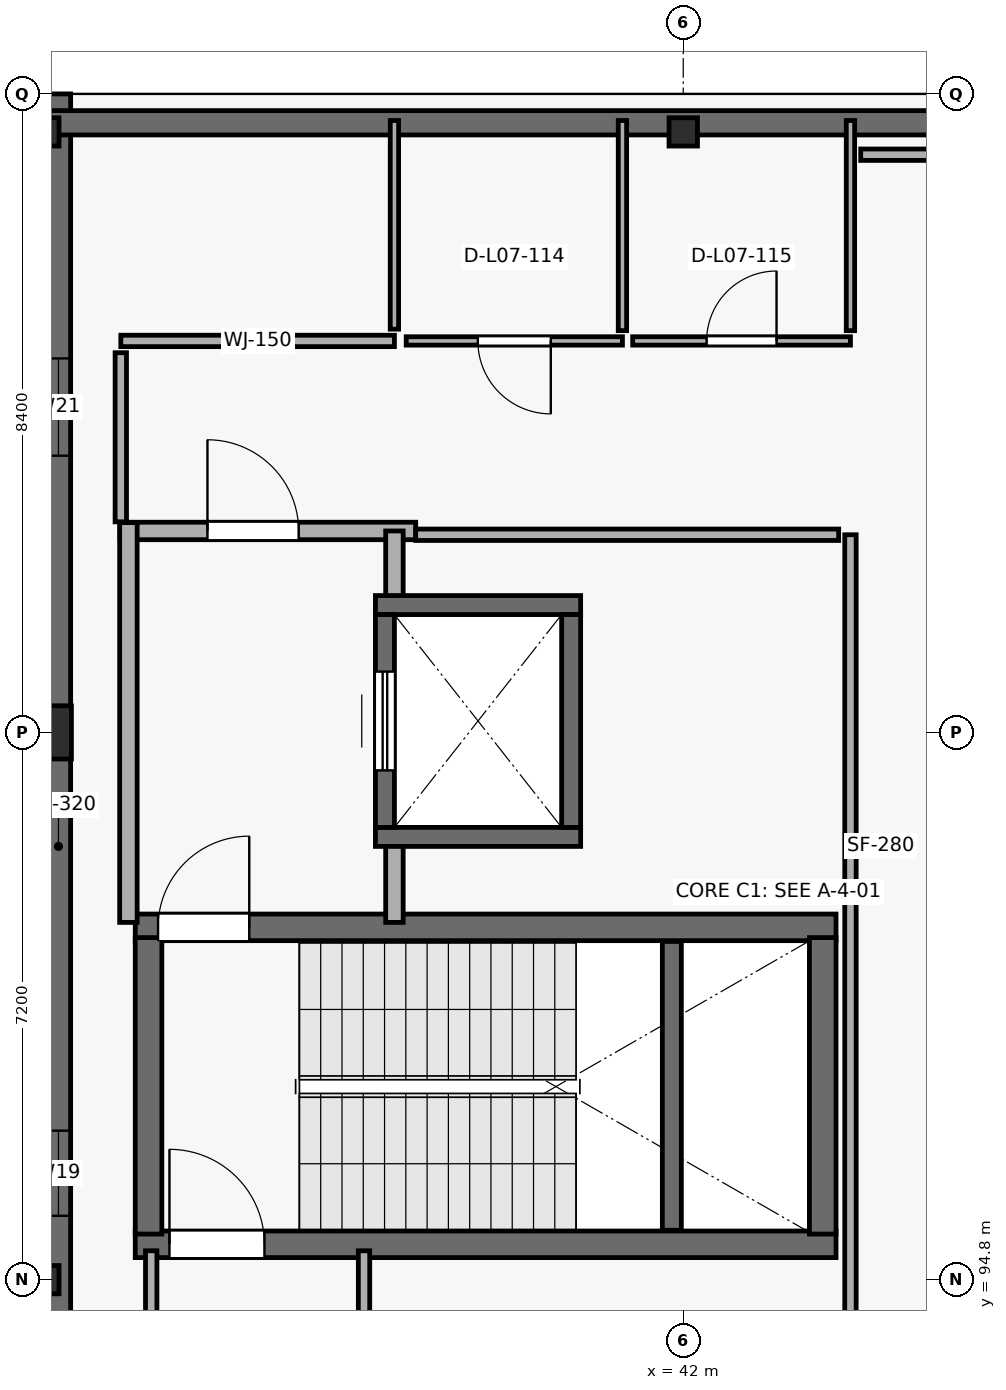
"""IFC4 building model, lengths in metres.
Left out: names, types, materials, properties, quantities, classifications, styles, units other than length and angle.
Written with IfcOpenShell. Run it as: python <this file> out.ifc"""

import sys

from ifc_helpers import new_model, si_unit, direction, frame, frame_2d, origin, origin_2d, place, context, subcontext, project, spatial, rectangle, i_section, extrude, element, fill, save


model = new_model("IFC4")
c1 = context("Model", 3, precision=1e-05, world=origin(), true_north=direction((0.0, 1.0)))
c2 = subcontext(c1, "Body", "Model", "MODEL_VIEW")
j1 = project(units=[si_unit("LENGTHUNIT", "METRE"), si_unit("PLANEANGLEUNIT", "RADIAN")], contexts=[c1])
p1 = place(None, origin())
s1 = spatial("IfcSite", under=j1, at=p1, CompositionType="ELEMENT")
p2 = place(p1, origin())
s2 = spatial("IfcBuilding", under=s1, at=p2, CompositionType="ELEMENT")
p3 = place(p2, frame((0.0, 0.0, 30.6)))
s3 = spatial("IfcBuildingStorey", under=s2, at=p3, CompositionType="ELEMENT", Elevation=30.6)
p4 = place(p3, frame((33.6, 94.8, 0.0), z_axis=(0.0, 0.0, 1.0), x_axis=(1.0, 0.0, 0.0)))
e1 = element("IfcColumn", 1, at=p4, inside=s3, PredefinedType="COLUMN", context=c2, shape_type="SweptSolid", body=[
    extrude(i_section(OverallWidth=0.374, OverallDepth=0.372, WebThickness=0.016, FlangeThickness=0.026, at=origin_2d()), origin(), (0.0, 0.0, 1.0), 5.1),
])
p5 = place(p3, frame((33.6, 102.0, 0.0), z_axis=(0.0, 0.0, 1.0), x_axis=(1.0, 0.0, 0.0)))
e2 = element("IfcColumn", 2, at=p5, inside=s3, PredefinedType="COLUMN", context=c2, shape_type="SweptSolid", body=[
    extrude(rectangle(XDim=0.7, YDim=0.7, at=origin_2d()), origin(), (0.0, 0.0, 1.0), 5.1),
])
for number, where, z_axis, x_axis in (
    (3, (33.6, 109.9, 0.0), (0.0, 0.0, 1.0), (1.0, 0.0, 0.0)),
    (4, (42.0, 109.9, 0.0), (0.0, 0.0, 1.0), (1.0, 0.0, 0.0)),
):
    element("IfcColumn", number, at=place(p3, frame(where, z_axis=z_axis, x_axis=x_axis)), inside=s3, PredefinedType="COLUMN", context=c2, shape_type="SweptSolid", body=[
        extrude(i_section(OverallWidth=0.374, OverallDepth=0.372, WebThickness=0.016, FlangeThickness=0.026, at=origin_2d()), origin(), (0.0, 0.0, 1.0), 5.1),
    ])
p6 = place(p3, frame((33.78, 90.6, 0.0), z_axis=(0.0, 0.0, 1.0), x_axis=(0.0, 1.0, 0.0)))
e5 = element("IfcWall", 5, at=p6, inside=s3, PredefinedType="SOLIDWALL", context=c2, shape_type="SweptSolid", body=[
    extrude(rectangle(XDim=19.8, YDim=0.32, at=frame_2d((9.9, 0.0))), origin(), (0.0, 0.0, 1.0), 4.84),
])
p7 = place(p6, frame((5.04, 0.0, 0.75)))
e6 = element("IfcOpeningElement", 6, at=p7, cuts=e5, PredefinedType="OPENING", context=c2, shape_type="SweptSolid", body=[
    extrude(rectangle(XDim=1.12, YDim=3.05, at=frame_2d((0.56, 1.525))), frame((0.0, 0.17, 0.0), z_axis=(0.0, -1.0, 0.0), x_axis=(1.0, 0.0, 0.0)), (0.0, 0.0, 1.0), 0.34),
])
p8 = place(p6, frame((15.04, 0.0, 0.75)))
e7 = element("IfcOpeningElement", 7, at=p8, cuts=e5, PredefinedType="OPENING", context=c2, shape_type="SweptSolid", body=[
    extrude(rectangle(XDim=1.28, YDim=1.85, at=frame_2d((0.64, 0.925))), frame((0.0, 0.17, 0.0), z_axis=(0.0, -1.0, 0.0), x_axis=(1.0, 0.0, 0.0)), (0.0, 0.0, 1.0), 0.34),
])
p9 = place(p3, frame((33.6, 110.02, 0.0), z_axis=(0.0, 0.0, 1.0), x_axis=(1.0, 0.0, 0.0)))
e8 = element("IfcWall", 8, at=p9, inside=s3, PredefinedType="SOLIDWALL", context=c2, shape_type="SweptSolid", body=[
    extrude(rectangle(XDim=33.6, YDim=0.32, at=frame_2d((16.8, 0.0))), origin(), (0.0, 0.0, 1.0), 4.84),
])
p10 = place(p3, frame((34.79, 95.265, 0.0), z_axis=(0.0, 0.0, 1.0), x_axis=(1.0, 0.0, 0.0)))
e9 = element("IfcWall", 9, at=p10, inside=s3, PredefinedType="SHEAR", context=c2, shape_type="SweptSolid", body=[
    extrude(rectangle(XDim=9.22, YDim=0.35, at=frame_2d((4.61, 0.0))), origin(), (0.0, 0.0, 1.0), 4.84),
])
p11 = place(p10, frame((0.45, 0.0, 0.0)))
e10 = element("IfcOpeningElement", 10, at=p11, cuts=e9, PredefinedType="OPENING", context=c2, shape_type="SweptSolid", body=[
    extrude(rectangle(XDim=1.25, YDim=2.2, at=frame_2d((0.625, 1.1))), frame((0.0, 0.185, 0.0), z_axis=(0.0, -1.0, 0.0), x_axis=(1.0, 0.0, 0.0)), (0.0, 0.0, 1.0), 0.37),
])
p12 = place(p3, frame((44.01, 99.435, 0.0), z_axis=(0.0, 0.0, 1.0), x_axis=(-1.0, 0.0, 0.0)))
e11 = element("IfcWall", 11, at=p12, inside=s3, PredefinedType="SHEAR", context=c2, shape_type="SweptSolid", body=[
    extrude(rectangle(XDim=9.22, YDim=0.35, at=frame_2d((4.61, 0.0))), origin(), (0.0, 0.0, 1.0), 4.84),
])
p13 = place(p12, frame((7.72, 0.0, 0.0)))
e12 = element("IfcOpeningElement", 12, at=p13, cuts=e11, PredefinedType="OPENING", context=c2, shape_type="SweptSolid", body=[
    extrude(rectangle(XDim=1.2, YDim=2.2, at=frame_2d((0.6, 1.1))), frame((0.0, 0.185, 0.0), z_axis=(0.0, -1.0, 0.0), x_axis=(1.0, 0.0, 0.0)), (0.0, 0.0, 1.0), 0.37),
])
for number, where, z_axis, x_axis in (
    (13, (34.965, 95.4, 0.0), (0.0, 0.0, 1.0), (0.0, 1.0, 0.0)),
    (14, (43.835, 99.3, 0.0), (0.0, 0.0, 1.0), (0.0, -1.0, 0.0)),
):
    element("IfcWall", number, at=place(p3, frame(where, z_axis=z_axis, x_axis=x_axis)), inside=s3, PredefinedType="SHEAR", context=c2, shape_type="SweptSolid", body=[
        extrude(rectangle(XDim=3.9, YDim=0.35, at=frame_2d((1.95, 0.0))), origin(), (0.0, 0.0, 1.0), 4.84),
    ])
p14 = place(p3, frame((41.85, 95.45, 0.0), z_axis=(0.0, 0.0, 1.0), x_axis=(0.0, 1.0, 0.0)))
e15 = element("IfcWall", 15, at=p14, inside=s3, PredefinedType="SHEAR", context=c2, shape_type="SweptSolid", body=[
    extrude(rectangle(XDim=3.8, YDim=0.25, at=frame_2d((1.9, 0.0))), origin(), (0.0, 0.0, 1.0), 2.37),
])
p15 = place(p3, frame((34.59, 104.65, 0.0), z_axis=(0.0, 0.0, 1.0), x_axis=(1.0, 0.0, 0.0)))
e16 = element("IfcWall", 16, at=p15, inside=s3, PredefinedType="PARTITIONING", context=c2, shape_type="SweptSolid", body=[
    extrude(rectangle(XDim=3.89, YDim=0.23, at=frame_2d((1.945, 0.0))), origin(), (0.0, 0.0, 1.0), 4.84),
])
p16 = place(p15, frame((1.15, 0.0, 0.0)))
e17 = element("IfcOpeningElement", 17, at=p16, cuts=e16, PredefinedType="OPENING", context=c2, shape_type="SweptSolid", body=[
    extrude(rectangle(XDim=1.2, YDim=2.2, at=frame_2d((0.6, 1.1))), frame((0.0, 0.125, 0.0), z_axis=(0.0, -1.0, 0.0), x_axis=(1.0, 0.0, 0.0)), (0.0, 0.0, 1.0), 0.25),
])
p17 = place(p3, frame((34.7, 99.5, 0.0), z_axis=(0.0, 0.0, 1.0), x_axis=(0.0, 1.0, 0.0)))
e18 = element("IfcWall", 18, at=p17, inside=s3, PredefinedType="PARTITIONING", context=c2, shape_type="SweptSolid", body=[
    extrude(rectangle(XDim=5.26, YDim=0.23, at=frame_2d((2.63, 0.0))), origin(), (0.0, 0.0, 1.0), 4.84),
])
p18 = place(p3, frame((38.2, 104.65, 0.0), z_axis=(0.0, 0.0, 1.0), x_axis=(0.0, -1.0, 0.0)))
e19 = element("IfcWall", 19, at=p18, inside=s3, PredefinedType="PARTITIONING", context=c2, shape_type="SweptSolid", body=[
    extrude(rectangle(XDim=1.1, YDim=0.23, at=frame_2d((0.55, 0.0))), origin(), (0.0, 0.0, 1.0), 4.84),
])
p19 = place(p3, frame((38.2, 100.75, 0.0), z_axis=(0.0, 0.0, 1.0), x_axis=(0.0, -1.0, 0.0)))
e20 = element("IfcWall", 20, at=p19, inside=s3, PredefinedType="PARTITIONING", context=c2, shape_type="SweptSolid", body=[
    extrude(rectangle(XDim=1.25, YDim=0.23, at=frame_2d((0.625, 0.0))), origin(), (0.0, 0.0, 1.0), 4.84),
])
for number, where, z_axis, x_axis in (
    (21, (37.95, 100.625, 0.0), (0.0, 0.0, 1.0), (1.0, 0.0, 0.0)),
    (22, (40.65, 103.675, 0.0), (0.0, 0.0, 1.0), (-1.0, 0.0, 0.0)),
):
    element("IfcWall", number, at=place(p3, frame(where, z_axis=z_axis, x_axis=x_axis)), inside=s3, PredefinedType="SHEAR", context=c2, shape_type="SweptSolid", body=[
        extrude(rectangle(XDim=2.7, YDim=0.25, at=frame_2d((1.35, 0.0))), origin(), (0.0, 0.0, 1.0), 4.84),
    ])
p20 = place(p3, frame((38.075, 100.75, 0.0), z_axis=(0.0, 0.0, 1.0), x_axis=(0.0, 1.0, 0.0)))
e23 = element("IfcWall", 23, at=p20, inside=s3, PredefinedType="SHEAR", context=c2, shape_type="SweptSolid", body=[
    extrude(rectangle(XDim=2.8, YDim=0.25, at=frame_2d((1.4, 0.0))), origin(), (0.0, 0.0, 1.0), 4.84),
])
p21 = place(p20, frame((0.75, 0.0, 0.0)))
e24 = element("IfcOpeningElement", 24, at=p21, cuts=e23, PredefinedType="OPENING", context=c2, shape_type="SweptSolid", body=[
    extrude(rectangle(XDim=1.3, YDim=2.25, at=frame_2d((0.65, 1.125))), frame((0.0, 0.135, 0.0), z_axis=(0.0, -1.0, 0.0), x_axis=(1.0, 0.0, 0.0)), (0.0, 0.0, 1.0), 0.27),
])
p22 = place(p3, frame((40.525, 103.55, 0.0), z_axis=(0.0, 0.0, 1.0), x_axis=(0.0, -1.0, 0.0)))
e25 = element("IfcWall", 25, at=p22, inside=s3, PredefinedType="SHEAR", context=c2, shape_type="SweptSolid", body=[
    extrude(rectangle(XDim=2.8, YDim=0.25, at=frame_2d((1.4, 0.0))), origin(), (0.0, 0.0, 1.0), 4.84),
])
p23 = place(p3, frame((44.2, 104.6, 0.0), z_axis=(0.0, 0.0, 1.0), x_axis=(0.0, -1.0, 0.0)))
e26 = element("IfcWall", 26, at=p23, inside=s3, PredefinedType="PARTITIONING", context=c2, shape_type="SweptSolid", body=[
    extrude(rectangle(XDim=10.75, YDim=0.15, at=frame_2d((5.375, 0.0))), origin(), (0.0, 0.0, 1.0), 4.84),
])
p24 = place(p3, frame((38.48, 104.6, 0.0), z_axis=(0.0, 0.0, 1.0), x_axis=(1.0, 0.0, 0.0)))
e27 = element("IfcWall", 27, at=p24, inside=s3, PredefinedType="PARTITIONING", context=c2, shape_type="SweptSolid", body=[
    extrude(rectangle(XDim=5.565, YDim=0.15, at=frame_2d((2.782, 0.0))), origin(), (0.0, 0.0, 1.0), 4.84),
])
p25 = place(p3, frame((38.2, 107.15, 0.0), z_axis=(0.0, 0.0, 1.0), x_axis=(-1.0, 0.0, 0.0)))
e28 = element("IfcWall", 28, at=p25, inside=s3, PredefinedType="PARTITIONING", context=c2, shape_type="SweptSolid", body=[
    extrude(rectangle(XDim=3.6, YDim=0.15, at=frame_2d((1.8, 0.0))), origin(), (0.0, 0.0, 1.0), 4.84),
])
p26 = place(p3, frame((41.2, 107.15, 0.0), z_axis=(0.0, 0.0, 1.0), x_axis=(-1.0, 0.0, 0.0)))
e29 = element("IfcWall", 29, at=p26, inside=s3, PredefinedType="PARTITIONING", context=c2, shape_type="SweptSolid", body=[
    extrude(rectangle(XDim=2.845, YDim=0.11, at=frame_2d((1.422, 0.0))), origin(), (0.0, 0.0, 1.0), 4.84),
])
p27 = place(p26, frame((0.942, 0.0, 0.0)))
e30 = element("IfcOpeningElement", 30, at=p27, cuts=e29, PredefinedType="OPENING", context=c2, shape_type="SweptSolid", body=[
    extrude(rectangle(XDim=0.96, YDim=2.14, at=frame_2d((0.48, 1.07))), frame((0.0, 0.065, 0.0), z_axis=(0.0, -1.0, 0.0), x_axis=(1.0, 0.0, 0.0)), (0.0, 0.0, 1.0), 0.13),
])
p28 = place(p3, frame((44.2, 107.15, 0.0), z_axis=(0.0, 0.0, 1.0), x_axis=(-1.0, 0.0, 0.0)))
e31 = element("IfcWall", 31, at=p28, inside=s3, PredefinedType="PARTITIONING", context=c2, shape_type="SweptSolid", body=[
    extrude(rectangle(XDim=2.865, YDim=0.11, at=frame_2d((1.433, 0.0))), origin(), (0.0, 0.0, 1.0), 4.84),
])
p29 = place(p28, frame((0.972, 0.0, 0.0)))
e32 = element("IfcOpeningElement", 32, at=p29, cuts=e31, PredefinedType="OPENING", context=c2, shape_type="SweptSolid", body=[
    extrude(rectangle(XDim=0.92, YDim=2.12, at=frame_2d((0.46, 1.06))), frame((0.0, 0.065, 0.0), z_axis=(0.0, -1.0, 0.0), x_axis=(1.0, 0.0, 0.0)), (0.0, 0.0, 1.0), 0.13),
])
p30 = place(p3, frame((41.2, 110.05, 0.0), z_axis=(0.0, 0.0, 1.0), x_axis=(0.0, -1.0, 0.0)))
e33 = element("IfcWall", 33, at=p30, inside=s3, PredefinedType="PARTITIONING", context=c2, shape_type="SweptSolid", body=[
    extrude(rectangle(XDim=2.765, YDim=0.11, at=frame_2d((1.383, 0.0))), origin(), (0.0, 0.0, 1.0), 4.84),
])
p31 = place(p3, frame((38.2, 107.305, 0.0), z_axis=(0.0, 0.0, 1.0), x_axis=(0.0, 1.0, 0.0)))
e34 = element("IfcWall", 34, at=p31, inside=s3, PredefinedType="PARTITIONING", context=c2, shape_type="SweptSolid", body=[
    extrude(rectangle(XDim=2.745, YDim=0.11, at=frame_2d((1.373, 0.0))), origin(), (0.0, 0.0, 1.0), 4.84),
])
p32 = place(p3, frame((44.2, 110.05, 0.0), z_axis=(0.0, 0.0, 1.0), x_axis=(0.0, -1.0, 0.0)))
e35 = element("IfcWall", 35, at=p32, inside=s3, PredefinedType="PARTITIONING", context=c2, shape_type="SweptSolid", body=[
    extrude(rectangle(XDim=2.765, YDim=0.11, at=frame_2d((1.383, 0.0))), origin(), (0.0, 0.0, 1.0), 4.84),
])
p33 = place(p3, frame((34.6, 106.995, 0.0), z_axis=(0.0, 0.0, 1.0), x_axis=(0.0, -1.0, 0.0)))
e36 = element("IfcWall", 36, at=p33, inside=s3, PredefinedType="PARTITIONING", context=c2, shape_type="SweptSolid", body=[
    extrude(rectangle(XDim=2.225, YDim=0.15, at=frame_2d((1.113, 0.0))), origin(), (0.0, 0.0, 1.0), 4.84),
])
p34 = place(p3, frame((46.245, 109.6, 0.0), z_axis=(0.0, 0.0, 1.0), x_axis=(-1.0, 0.0, 0.0)))
e37 = element("IfcWall", 37, at=p34, inside=s3, PredefinedType="PARTITIONING", context=c2, shape_type="SweptSolid", body=[
    extrude(rectangle(XDim=1.91, YDim=0.15, at=frame_2d((0.955, 0.0))), origin(), (0.0, 0.0, 1.0), 3.9),
])
p35 = place(p3, frame((37.8, 94.005, 0.0), z_axis=(0.0, 0.0, 1.0), x_axis=(0.0, 1.0, 0.0)))
e38 = element("IfcWall", 38, at=p35, inside=s3, PredefinedType="PARTITIONING", context=c2, shape_type="SweptSolid", body=[
    extrude(rectangle(XDim=1.175, YDim=0.15, at=frame_2d((0.587, 0.0))), origin(), (0.0, 0.0, 1.0), 4.84),
])
p36 = place(p3, frame((35.0, 95.18, 0.0), z_axis=(0.0, 0.0, 1.0), x_axis=(0.0, -1.0, 0.0)))
e39 = element("IfcWall", 39, at=p36, inside=s3, PredefinedType="PARTITIONING", context=c2, shape_type="SweptSolid", body=[
    extrude(rectangle(XDim=1.33, YDim=0.15, at=frame_2d((0.665, 0.0))), origin(), (0.0, 0.0, 1.0), 4.84),
])
p37 = place(p7, origin())
e40 = element("IfcWindow", 40, at=p37, inside=s3, PartitioningType="SINGLE_PANEL", PredefinedType="WINDOW", context=c2, shape_type="SweptSolid", body=[
    extrude(rectangle(XDim=1.12, YDim=3.05, at=frame_2d((0.56, 1.525))), frame((0.0, 0.03, 0.0), z_axis=(0.0, -1.0, 0.0), x_axis=(1.0, 0.0, 0.0)), (0.0, 0.0, 1.0), 0.06),
])
fill(e6, e40)
p38 = place(p8, origin())
e41 = element("IfcWindow", 41, at=p38, inside=s3, PartitioningType="SINGLE_PANEL", PredefinedType="WINDOW", context=c2, shape_type="SweptSolid", body=[
    extrude(rectangle(XDim=1.28, YDim=1.85, at=frame_2d((0.64, 0.925))), frame((0.0, 0.03, 0.0), z_axis=(0.0, -1.0, 0.0), x_axis=(1.0, 0.0, 0.0)), (0.0, 0.0, 1.0), 0.06),
])
fill(e7, e41)
p39 = place(p11, origin())
e42 = element("IfcDoor", 42, at=p39, inside=s3, OperationType="SINGLE_SWING_LEFT", PredefinedType="DOOR", context=c2, shape_type="SweptSolid", body=[
    extrude(rectangle(XDim=1.25, YDim=2.2, at=frame_2d((0.625, 1.1))), frame((0.0, 0.025, 0.0), z_axis=(0.0, -1.0, 0.0), x_axis=(1.0, 0.0, 0.0)), (0.0, 0.0, 1.0), 0.05),
])
fill(e10, e42)
p40 = place(p13, origin())
e43 = element("IfcDoor", 43, at=p40, inside=s3, OperationType="SINGLE_SWING_RIGHT", PredefinedType="DOOR", context=c2, shape_type="SweptSolid", body=[
    extrude(rectangle(XDim=1.2, YDim=2.2, at=frame_2d((0.6, 1.1))), frame((0.0, 0.025, 0.0), z_axis=(0.0, -1.0, 0.0), x_axis=(1.0, 0.0, 0.0)), (0.0, 0.0, 1.0), 0.05),
])
fill(e12, e43)
p41 = place(p16, origin())
e44 = element("IfcDoor", 44, at=p41, inside=s3, OperationType="SINGLE_SWING_LEFT", PredefinedType="DOOR", context=c2, shape_type="SweptSolid", body=[
    extrude(rectangle(XDim=1.2, YDim=2.2, at=frame_2d((0.6, 1.1))), frame((0.0, 0.025, 0.0), z_axis=(0.0, -1.0, 0.0), x_axis=(1.0, 0.0, 0.0)), (0.0, 0.0, 1.0), 0.05),
])
fill(e17, e44)
p42 = place(p21, origin())
e45 = element("IfcDoor", 45, at=p42, inside=s3, OperationType="SLIDING_TO_RIGHT", PredefinedType="DOOR", context=c2, shape_type="SweptSolid", body=[
    extrude(rectangle(XDim=1.3, YDim=2.25, at=frame_2d((0.65, 1.125))), frame((0.0, 0.025, 0.0), z_axis=(0.0, -1.0, 0.0), x_axis=(1.0, 0.0, 0.0)), (0.0, 0.0, 1.0), 0.05),
])
fill(e24, e45)
p43 = place(p27, origin())
e46 = element("IfcDoor", 46, at=p43, inside=s3, OperationType="SINGLE_SWING_LEFT", PredefinedType="DOOR", context=c2, shape_type="SweptSolid", body=[
    extrude(rectangle(XDim=0.96, YDim=2.14, at=frame_2d((0.48, 1.07))), frame((0.0, 0.025, 0.0), z_axis=(0.0, -1.0, 0.0), x_axis=(1.0, 0.0, 0.0)), (0.0, 0.0, 1.0), 0.05),
])
fill(e30, e46)
p44 = place(p29, origin())
e47 = element("IfcDoor", 47, at=p44, inside=s3, OperationType="SINGLE_SWING_RIGHT", PredefinedType="DOOR", context=c2, shape_type="SweptSolid", body=[
    extrude(rectangle(XDim=0.92, YDim=2.12, at=frame_2d((0.46, 1.06))), frame((0.0, 0.025, 0.0), z_axis=(0.0, -1.0, 0.0), x_axis=(1.0, 0.0, 0.0)), (0.0, 0.0, 1.0), 0.05),
])
fill(e32, e47)
save(model, sys.argv[1])
